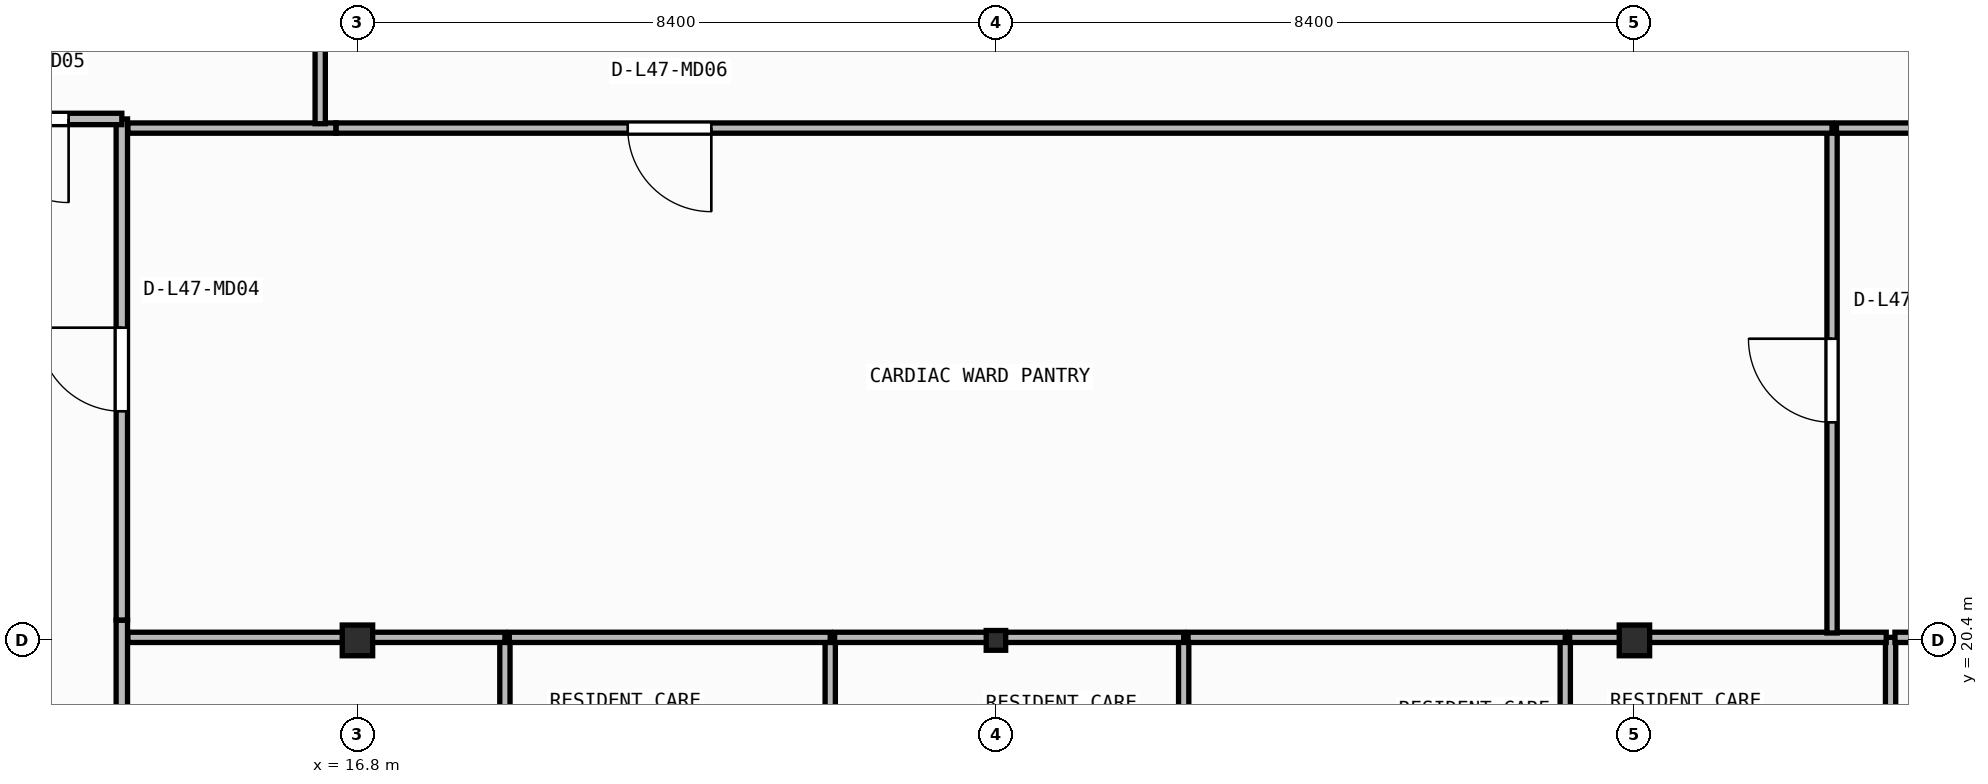
"""IFC4 building model, lengths in metres.
Left out: names, types, materials, properties, quantities, classifications, styles, units other than length and angle.
Written with IfcOpenShell. Run it as: python <this file> out.ifc"""

import sys

from ifc_helpers import new_model, si_unit, direction, frame, frame_2d, origin, origin_2d, place, context, subcontext, project, spatial, rectangle, i_section, extrude, element, fill, save


model = new_model("IFC4")
c1 = context("Model", 3, precision=1e-05, world=origin(), true_north=direction((0.0, 1.0)))
c2 = subcontext(c1, "Body", "Model", "MODEL_VIEW")
j1 = project(units=[si_unit("LENGTHUNIT", "METRE"), si_unit("PLANEANGLEUNIT", "RADIAN")], contexts=[c1])
p1 = place(None, origin())
s1 = spatial("IfcSite", under=j1, at=p1, CompositionType="ELEMENT")
p2 = place(p1, origin())
s2 = spatial("IfcBuilding", under=s1, at=p2, CompositionType="ELEMENT")
p3 = place(p2, frame((0.0, 0.0, 192.1)))
s3 = spatial("IfcBuildingStorey", under=s2, at=p3, CompositionType="ELEMENT", Elevation=192.1)
p4 = place(p3, frame((16.8, 20.4, 0.0), z_axis=(0.0, 0.0, 1.0), x_axis=(1.0, 0.0, 0.0)))
e1 = element("IfcColumn", 1, at=p4, inside=s3, PredefinedType="COLUMN", context=c2, shape_type="SweptSolid", body=[
    extrude(i_section(OverallWidth=0.4, OverallDepth=0.404, WebThickness=0.02, FlangeThickness=0.032, at=origin_2d()), origin(), (0.0, 0.0, 1.0), 3.95),
])
p5 = place(p3, frame((25.2, 20.4, 0.0), z_axis=(0.0, 0.0, 1.0), x_axis=(1.0, 0.0, 0.0)))
e2 = element("IfcColumn", 2, at=p5, inside=s3, PredefinedType="COLUMN", context=c2, shape_type="SweptSolid", body=[
    extrude(i_section(OverallWidth=0.256, OverallDepth=0.26, WebThickness=0.01, FlangeThickness=0.017, FilletRadius=0.013, at=origin_2d()), origin(), (0.0, 0.0, 1.0), 3.95),
])
p6 = place(p3, frame((33.6, 20.4, 0.0), z_axis=(0.0, 0.0, 1.0), x_axis=(1.0, 0.0, 0.0)))
e3 = element("IfcColumn", 3, at=p6, inside=s3, PredefinedType="COLUMN", context=c2, shape_type="SweptSolid", body=[
    extrude(i_section(OverallWidth=0.4, OverallDepth=0.404, WebThickness=0.02, FlangeThickness=0.032, at=origin_2d()), origin(), (0.0, 0.0, 1.0), 3.95),
])
p7 = place(p3, frame((13.7, 17.814, 0.0), z_axis=(0.0, 0.0, 1.0), x_axis=(0.0, 1.0, 0.0)))
e4 = element("IfcWall", 4, at=p7, inside=s3, PredefinedType="PARTITIONING", context=c2, shape_type="SweptSolid", body=[
    extrude(rectangle(XDim=2.852, YDim=0.15, at=frame_2d((1.426, 0.0))), origin(), (0.0, 0.0, 1.0), 3.71),
])
p8 = place(p3, frame((13.7, 20.668, 0.0), z_axis=(0.0, 0.0, 1.0), x_axis=(0.0, 1.0, 0.0)))
e5 = element("IfcWall", 5, at=p8, inside=s3, PredefinedType="PARTITIONING", context=c2, shape_type="SweptSolid", body=[
    extrude(rectangle(XDim=6.592, YDim=0.15, at=frame_2d((3.296, 0.0))), origin(), (0.0, 0.0, 1.0), 3.71),
])
p9 = place(p8, frame((2.746, 0.0, 0.0)))
e6 = element("IfcOpeningElement", 6, at=p9, cuts=e5, PredefinedType="OPENING", context=c2, shape_type="SweptSolid", body=[
    extrude(rectangle(XDim=1.1, YDim=2.1, at=frame_2d((0.55, 1.05))), frame((0.0, 0.085, 0.0), z_axis=(0.0, -1.0, 0.0), x_axis=(1.0, 0.0, 0.0)), (0.0, 0.0, 1.0), 0.17),
])
p10 = place(p3, frame((13.7, 27.26, 0.0), z_axis=(0.0, 0.0, 1.0), x_axis=(-1.0, 0.0, 0.0)))
e7 = element("IfcWall", 7, at=p10, inside=s3, PredefinedType="PARTITIONING", context=c2, shape_type="SweptSolid", body=[
    extrude(rectangle(XDim=2.5, YDim=0.15, at=frame_2d((1.25, 0.0))), origin(), (0.0, 0.0, 1.0), 3.71),
])
p11 = place(p10, frame((0.7, 0.0, 0.0)))
e8 = element("IfcOpeningElement", 8, at=p11, cuts=e7, PredefinedType="OPENING", context=c2, shape_type="SweptSolid", body=[
    extrude(rectangle(XDim=1.1, YDim=2.1, at=frame_2d((0.55, 1.05))), frame((0.0, 0.085, 0.0), z_axis=(0.0, -1.0, 0.0), x_axis=(1.0, 0.0, 0.0)), (0.0, 0.0, 1.0), 0.17),
])
p12 = place(p3, frame((18.74, 17.833, 0.0), z_axis=(0.0, 0.0, 1.0), x_axis=(0.0, 1.0, 0.0)))
e9 = element("IfcWall", 9, at=p12, inside=s3, PredefinedType="PARTITIONING", context=c2, shape_type="SweptSolid", body=[
    extrude(rectangle(XDim=2.607, YDim=0.135, at=frame_2d((1.304, 0.0))), origin(), (0.0, 0.0, 1.0), 3.71),
])
p13 = place(p3, frame((18.74, 20.44, 0.0), z_axis=(0.0, 0.0, 1.0), x_axis=(-1.0, 0.0, 0.0)))
e10 = element("IfcWall", 10, at=p13, inside=s3, PredefinedType="PARTITIONING", context=c2, shape_type="SweptSolid", body=[
    extrude(rectangle(XDim=4.96, YDim=0.135, at=frame_2d((2.48, 0.0))), origin(), (0.0, 0.0, 1.0), 3.152),
])
p14 = place(p3, frame((23.02, 17.833, 0.0), z_axis=(0.0, 0.0, 1.0), x_axis=(0.0, 1.0, 0.0)))
e11 = element("IfcWall", 11, at=p14, inside=s3, PredefinedType="PARTITIONING", context=c2, shape_type="SweptSolid", body=[
    extrude(rectangle(XDim=2.607, YDim=0.135, at=frame_2d((1.304, 0.0))), origin(), (0.0, 0.0, 1.0), 3.71),
])
p15 = place(p3, frame((23.02, 20.44, 0.0), z_axis=(0.0, 0.0, 1.0), x_axis=(-1.0, 0.0, 0.0)))
e12 = element("IfcWall", 12, at=p15, inside=s3, PredefinedType="PARTITIONING", context=c2, shape_type="SweptSolid", body=[
    extrude(rectangle(XDim=4.222, YDim=0.135, at=frame_2d((2.111, 0.0))), origin(), (0.0, 0.0, 1.0), 3.152),
])
p16 = place(p3, frame((27.67, 17.833, 0.0), z_axis=(0.0, 0.0, 1.0), x_axis=(0.0, 1.0, 0.0)))
e13 = element("IfcWall", 13, at=p16, inside=s3, PredefinedType="PARTITIONING", context=c2, shape_type="SweptSolid", body=[
    extrude(rectangle(XDim=2.607, YDim=0.135, at=frame_2d((1.304, 0.0))), origin(), (0.0, 0.0, 1.0), 3.71),
])
p17 = place(p3, frame((27.67, 20.44, 0.0), z_axis=(0.0, 0.0, 1.0), x_axis=(-1.0, 0.0, 0.0)))
e14 = element("IfcWall", 14, at=p17, inside=s3, PredefinedType="PARTITIONING", context=c2, shape_type="SweptSolid", body=[
    extrude(rectangle(XDim=4.593, YDim=0.135, at=frame_2d((2.296, 0.0))), origin(), (0.0, 0.0, 1.0), 3.152),
])
p18 = place(p3, frame((32.69, 17.833, 0.0), z_axis=(0.0, 0.0, 1.0), x_axis=(0.0, 1.0, 0.0)))
e15 = element("IfcWall", 15, at=p18, inside=s3, PredefinedType="PARTITIONING", context=c2, shape_type="SweptSolid", body=[
    extrude(rectangle(XDim=2.607, YDim=0.135, at=frame_2d((1.304, 0.0))), origin(), (0.0, 0.0, 1.0), 3.71),
])
p19 = place(p3, frame((32.69, 20.44, 0.0), z_axis=(0.0, 0.0, 1.0), x_axis=(-1.0, 0.0, 0.0)))
e16 = element("IfcWall", 16, at=p19, inside=s3, PredefinedType="PARTITIONING", context=c2, shape_type="SweptSolid", body=[
    extrude(rectangle(XDim=4.962, YDim=0.135, at=frame_2d((2.481, 0.0))), origin(), (0.0, 0.0, 1.0), 3.152),
])
p20 = place(p3, frame((36.97, 17.833, 0.0), z_axis=(0.0, 0.0, 1.0), x_axis=(0.0, 1.0, 0.0)))
e17 = element("IfcWall", 17, at=p20, inside=s3, PredefinedType="PARTITIONING", context=c2, shape_type="SweptSolid", body=[
    extrude(rectangle(XDim=2.607, YDim=0.135, at=frame_2d((1.304, 0.0))), origin(), (0.0, 0.0, 1.0), 3.71),
])
p21 = place(p3, frame((36.913, 20.44, 0.0), z_axis=(0.0, 0.0, 1.0), x_axis=(-1.0, 0.0, 0.0)))
e18 = element("IfcWall", 18, at=p21, inside=s3, PredefinedType="PARTITIONING", context=c2, shape_type="SweptSolid", body=[
    extrude(rectangle(XDim=4.165, YDim=0.135, at=frame_2d((2.083, 0.0))), origin(), (0.0, 0.0, 1.0), 3.152),
])
p22 = place(p3, frame((41.62, 20.44, 0.0), z_axis=(0.0, 0.0, 1.0), x_axis=(-1.0, 0.0, 0.0)))
e19 = element("IfcWall", 19, at=p22, inside=s3, PredefinedType="PARTITIONING", context=c2, shape_type="SweptSolid", body=[
    extrude(rectangle(XDim=4.593, YDim=0.135, at=frame_2d((2.296, 0.0))), origin(), (0.0, 0.0, 1.0), 3.152),
])
p23 = place(p3, frame((36.2, 20.498, 0.0), z_axis=(0.0, 0.0, 1.0), x_axis=(0.0, 1.0, 0.0)))
e20 = element("IfcWall", 20, at=p23, inside=s3, PredefinedType="PARTITIONING", context=c2, shape_type="SweptSolid", body=[
    extrude(rectangle(XDim=6.642, YDim=0.135, at=frame_2d((3.321, 0.0))), origin(), (0.0, 0.0, 1.0), 3.71),
])
p24 = place(p23, frame((2.771, 0.0, 0.0)))
e21 = element("IfcOpeningElement", 21, at=p24, cuts=e20, PredefinedType="OPENING", context=c2, shape_type="SweptSolid", body=[
    extrude(rectangle(XDim=1.1, YDim=2.1, at=frame_2d((0.55, 1.05))), frame((0.0, 0.077, 0.0), z_axis=(0.0, -1.0, 0.0), x_axis=(1.0, 0.0, 0.0)), (0.0, 0.0, 1.0), 0.155),
])
p25 = place(p3, frame((16.518, 27.14, 0.0), z_axis=(0.0, 0.0, 1.0), x_axis=(-1.0, 0.0, 0.0)))
e22 = element("IfcWall", 22, at=p25, inside=s3, PredefinedType="PARTITIONING", context=c2, shape_type="SweptSolid", body=[
    extrude(rectangle(XDim=2.738, YDim=0.135, at=frame_2d((1.369, 0.0))), origin(), (0.0, 0.0, 1.0), 3.71),
])
p26 = place(p3, frame((36.2, 27.14, 0.0), z_axis=(0.0, 0.0, 1.0), x_axis=(-1.0, 0.0, 0.0)))
e23 = element("IfcWall", 23, at=p26, inside=s3, PredefinedType="PARTITIONING", context=c2, shape_type="SweptSolid", body=[
    extrude(rectangle(XDim=19.68, YDim=0.135, at=frame_2d((9.84, 0.0))), origin(), (0.0, 0.0, 1.0), 3.71),
])
p27 = place(p26, frame((14.744, 0.0, 0.0)))
e24 = element("IfcOpeningElement", 24, at=p27, cuts=e23, PredefinedType="OPENING", context=c2, shape_type="SweptSolid", body=[
    extrude(rectangle(XDim=1.1, YDim=2.1, at=frame_2d((0.55, 1.05))), frame((0.0, 0.077, 0.0), z_axis=(0.0, -1.0, 0.0), x_axis=(1.0, 0.0, 0.0)), (0.0, 0.0, 1.0), 0.155),
])
p28 = place(p3, frame((38.637, 27.14, 0.0), z_axis=(0.0, 0.0, 1.0), x_axis=(-1.0, 0.0, 0.0)))
e25 = element("IfcWall", 25, at=p28, inside=s3, PredefinedType="PARTITIONING", context=c2, shape_type="SweptSolid", body=[
    extrude(rectangle(XDim=2.38, YDim=0.135, at=frame_2d((1.19, 0.0))), origin(), (0.0, 0.0, 1.0), 3.71),
])
p29 = place(p3, frame((16.31, 27.198, 0.0), z_axis=(0.0, 0.0, 1.0), x_axis=(0.0, 1.0, 0.0)))
e26 = element("IfcWall", 26, at=p29, inside=s3, PredefinedType="PARTITIONING", context=c2, shape_type="SweptSolid", body=[
    extrude(rectangle(XDim=7.093, YDim=0.135, at=frame_2d((3.547, 0.0))), origin(), (0.0, 0.0, 1.0), 3.152),
])
p30 = place(p9, origin())
e27 = element("IfcDoor", 27, at=p30, inside=s3, OperationType="SINGLE_SWING_RIGHT", PredefinedType="DOOR", context=c2, shape_type="SweptSolid", body=[
    extrude(rectangle(XDim=1.1, YDim=2.1, at=frame_2d((0.55, 1.05))), frame((0.0, 0.025, 0.0), z_axis=(0.0, -1.0, 0.0), x_axis=(1.0, 0.0, 0.0)), (0.0, 0.0, 1.0), 0.05),
])
fill(e6, e27)
p31 = place(p11, origin())
e28 = element("IfcDoor", 28, at=p31, inside=s3, OperationType="SINGLE_SWING_LEFT", PredefinedType="DOOR", context=c2, shape_type="SweptSolid", body=[
    extrude(rectangle(XDim=1.1, YDim=2.1, at=frame_2d((0.55, 1.05))), frame((0.0, 0.025, 0.0), z_axis=(0.0, -1.0, 0.0), x_axis=(1.0, 0.0, 0.0)), (0.0, 0.0, 1.0), 0.05),
])
fill(e8, e28)
p32 = place(p24, origin())
e29 = element("IfcDoor", 29, at=p32, inside=s3, OperationType="SINGLE_SWING_RIGHT", PredefinedType="DOOR", context=c2, shape_type="SweptSolid", body=[
    extrude(rectangle(XDim=1.1, YDim=2.1, at=frame_2d((0.55, 1.05))), frame((0.0, 0.025, 0.0), z_axis=(0.0, -1.0, 0.0), x_axis=(1.0, 0.0, 0.0)), (0.0, 0.0, 1.0), 0.05),
])
fill(e21, e29)
p33 = place(p27, origin())
e30 = element("IfcDoor", 30, at=p33, inside=s3, OperationType="SINGLE_SWING_LEFT", PredefinedType="DOOR", context=c2, shape_type="SweptSolid", body=[
    extrude(rectangle(XDim=1.1, YDim=2.1, at=frame_2d((0.55, 1.05))), frame((0.0, 0.025, 0.0), z_axis=(0.0, -1.0, 0.0), x_axis=(1.0, 0.0, 0.0)), (0.0, 0.0, 1.0), 0.05),
])
fill(e24, e30)
save(model, sys.argv[1])
